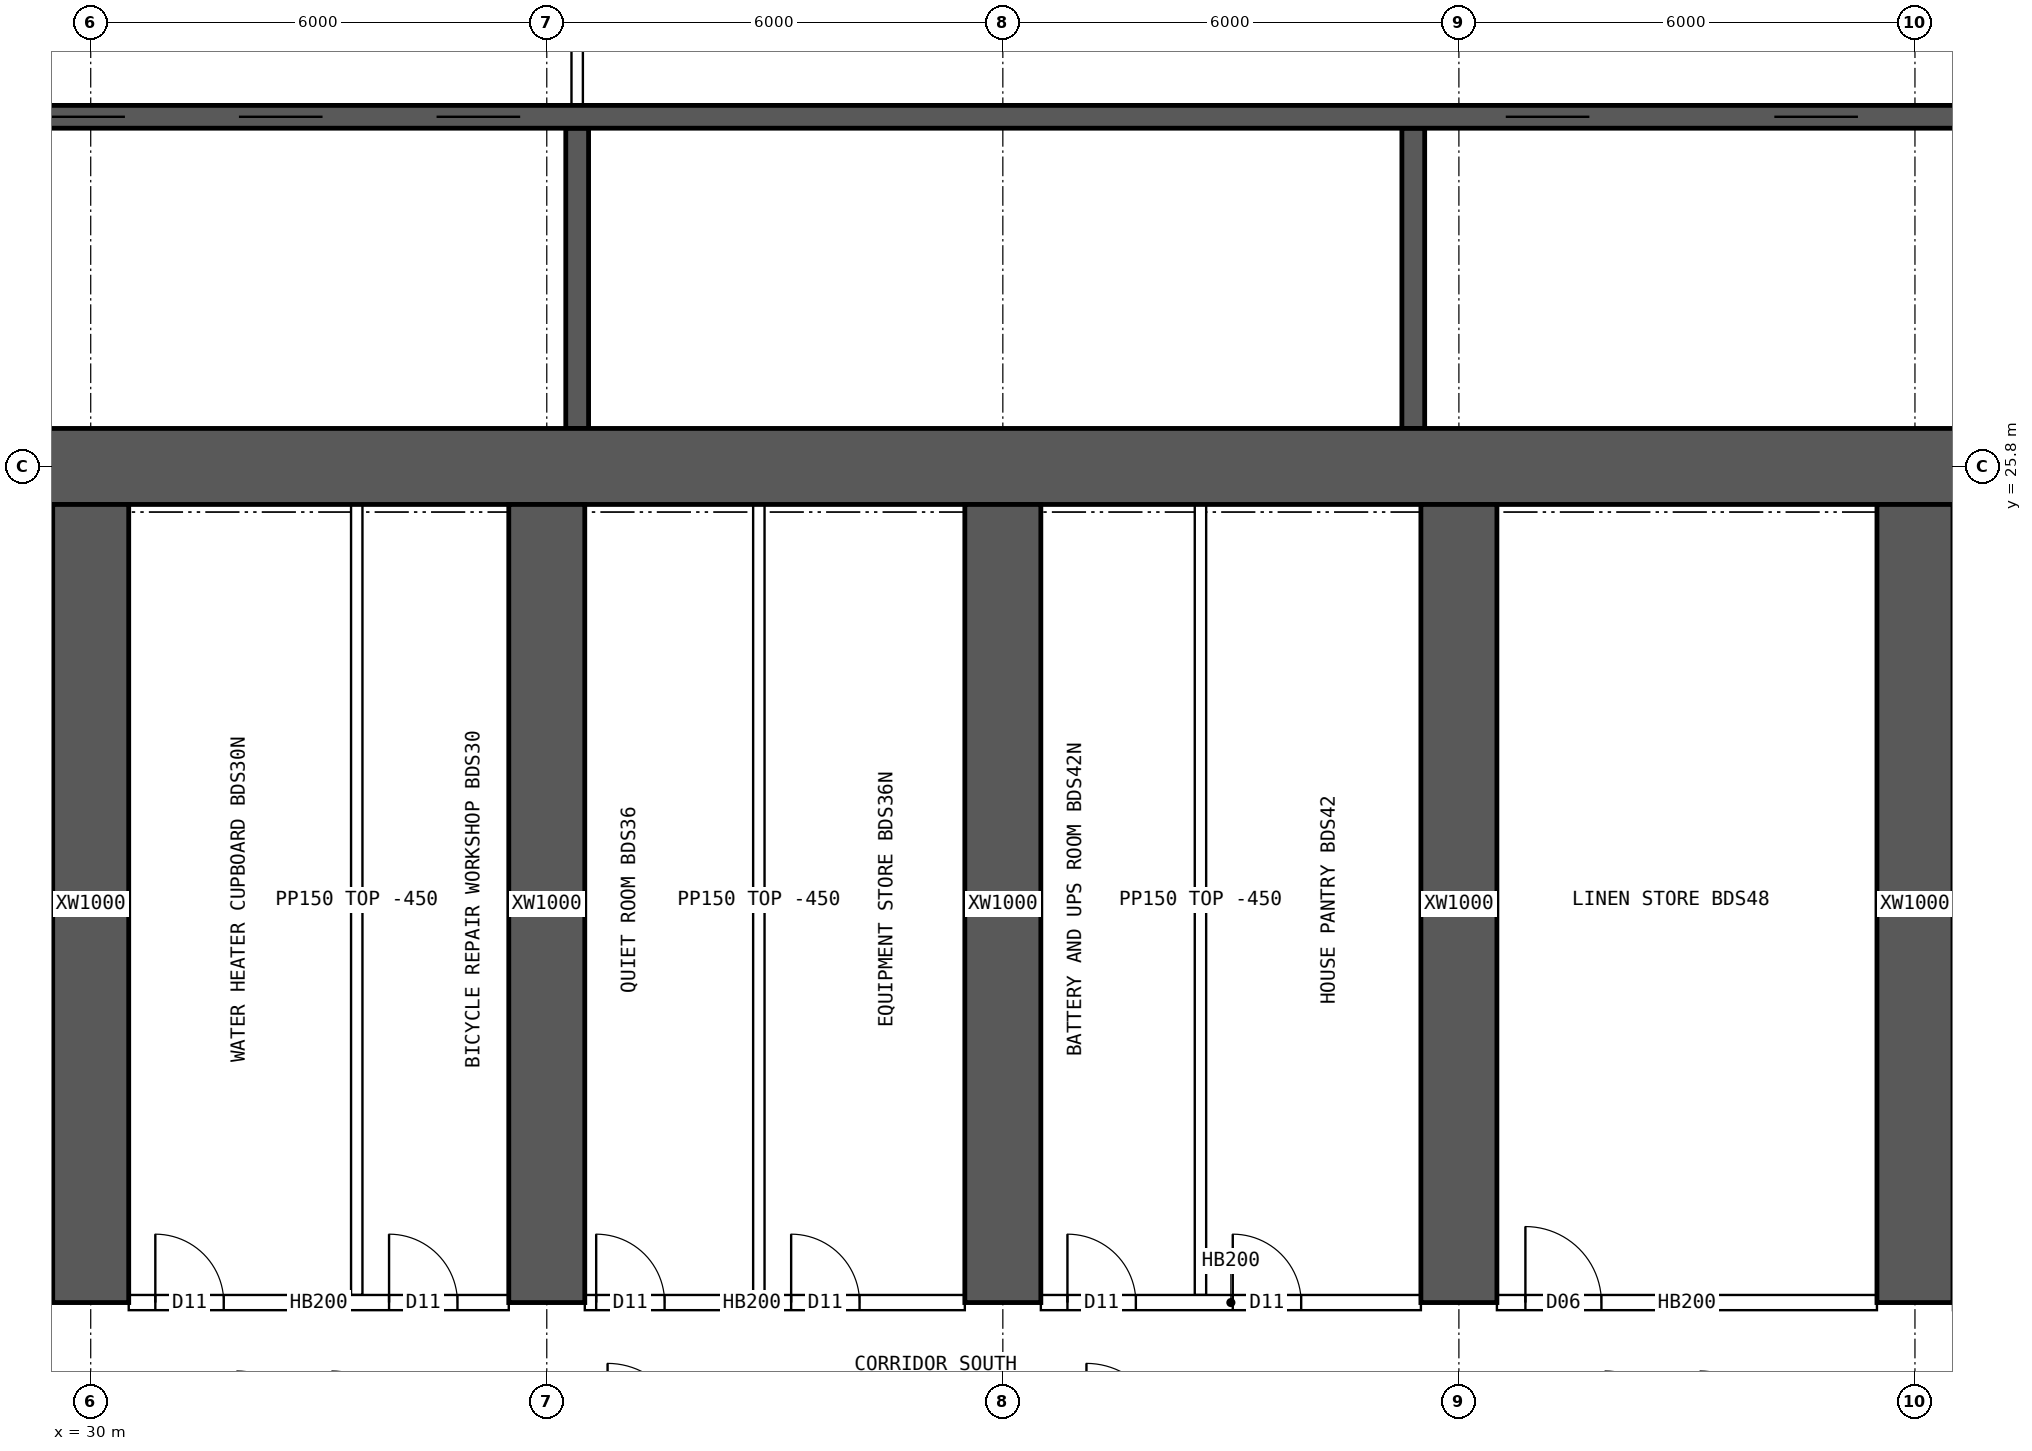
"""IFC4 building model, lengths in metres.
Left out: names, types, materials, properties, quantities, classifications, styles, units other than length and angle.
Written with IfcOpenShell. Run it as: python <this file> out.ifc"""

import sys

from ifc_helpers import new_model, si_unit, direction, frame, frame_2d, origin, place, context, subcontext, project, spatial, rectangle, extrude, element, fill, save


model = new_model("IFC4")
c1 = context("Model", 3, precision=1e-05, world=origin(), true_north=direction((0.0, 1.0)))
c2 = subcontext(c1, "Body", "Model", "MODEL_VIEW")
j1 = project(units=[si_unit("LENGTHUNIT", "METRE"), si_unit("PLANEANGLEUNIT", "RADIAN")], contexts=[c1])
p1 = place(None, origin())
s1 = spatial("IfcSite", under=j1, at=p1, CompositionType="ELEMENT")
p2 = place(p1, origin())
s2 = spatial("IfcBuilding", under=s1, at=p2, CompositionType="ELEMENT")
p3 = place(p2, frame((0.0, 0.0, 20.2)))
s3 = spatial("IfcBuildingStorey", under=s2, at=p3, CompositionType="ELEMENT", Elevation=20.2)
p4 = place(p3, frame((18.0, 25.8, 0.0), z_axis=(0.0, 0.0, 1.0), x_axis=(1.0, 0.0, 0.0)))
e1 = element("IfcWall", 1, at=p4, inside=s3, PredefinedType="SHEAR", context=c2, shape_type="SweptSolid", body=[
    extrude(rectangle(XDim=48.0, YDim=1.0, at=frame_2d((24.0, 0.0))), origin(), (0.0, 0.0, 1.0), 3.75),
])
p5 = place(p3, frame((18.5, 30.4, 0.0), z_axis=(0.0, 0.0, 1.0), x_axis=(1.0, 0.0, 0.0)))
e2 = element("IfcWall", 2, at=p5, inside=s3, PredefinedType="SHEAR", context=c2, shape_type="SweptSolid", body=[
    extrude(rectangle(XDim=47.0, YDim=0.3, at=frame_2d((23.5, 0.0))), origin(), (0.0, 0.0, 1.0), 3.75),
])
p6 = place(p5, frame((0.4, 0.0, 0.0)))
e3 = element("IfcOpeningElement", 3, at=p6, cuts=e2, PredefinedType="OPENING", context=c2, shape_type="SweptSolid", body=[
    extrude(rectangle(XDim=1.0, YDim=2.1, at=frame_2d((0.5, 1.05))), frame((0.0, 0.16, 0.0), z_axis=(0.0, -1.0, 0.0), x_axis=(1.0, 0.0, 0.0)), (0.0, 0.0, 1.0), 0.32),
])
p7 = place(p5, frame((45.6, 0.0, 0.0)))
e4 = element("IfcOpeningElement", 4, at=p7, cuts=e2, PredefinedType="OPENING", context=c2, shape_type="SweptSolid", body=[
    extrude(rectangle(XDim=1.0, YDim=2.1, at=frame_2d((0.5, 1.05))), frame((0.0, 0.16, 0.0), z_axis=(0.0, -1.0, 0.0), x_axis=(1.0, 0.0, 0.0)), (0.0, 0.0, 1.0), 0.32),
])
p8 = place(p5, frame((8.25, 0.0, 0.0)))
e5 = element("IfcOpeningElement", 5, at=p8, cuts=e2, PredefinedType="OPENING", context=c2, shape_type="SweptSolid", body=[
    extrude(rectangle(XDim=1.1, YDim=2.1, at=frame_2d((0.55, 1.05))), frame((0.0, 0.16, 0.0), z_axis=(0.0, -1.0, 0.0), x_axis=(1.0, 0.0, 0.0)), (0.0, 0.0, 1.0), 0.32),
])
p9 = place(p5, frame((10.85, 0.0, 0.0)))
e6 = element("IfcOpeningElement", 6, at=p9, cuts=e2, PredefinedType="OPENING", context=c2, shape_type="SweptSolid", body=[
    extrude(rectangle(XDim=1.1, YDim=2.1, at=frame_2d((0.55, 1.05))), frame((0.0, 0.16, 0.0), z_axis=(0.0, -1.0, 0.0), x_axis=(1.0, 0.0, 0.0)), (0.0, 0.0, 1.0), 0.32),
])
p10 = place(p5, frame((13.45, 0.0, 0.0)))
e7 = element("IfcOpeningElement", 7, at=p10, cuts=e2, PredefinedType="OPENING", context=c2, shape_type="SweptSolid", body=[
    extrude(rectangle(XDim=1.1, YDim=2.1, at=frame_2d((0.55, 1.05))), frame((0.0, 0.16, 0.0), z_axis=(0.0, -1.0, 0.0), x_axis=(1.0, 0.0, 0.0)), (0.0, 0.0, 1.0), 0.32),
])
p11 = place(p5, frame((16.05, 0.0, 0.0)))
e8 = element("IfcOpeningElement", 8, at=p11, cuts=e2, PredefinedType="OPENING", context=c2, shape_type="SweptSolid", body=[
    extrude(rectangle(XDim=1.1, YDim=2.1, at=frame_2d((0.55, 1.05))), frame((0.0, 0.16, 0.0), z_axis=(0.0, -1.0, 0.0), x_axis=(1.0, 0.0, 0.0)), (0.0, 0.0, 1.0), 0.32),
])
p12 = place(p5, frame((30.117, 0.0, 0.0)))
e9 = element("IfcOpeningElement", 9, at=p12, cuts=e2, PredefinedType="OPENING", context=c2, shape_type="SweptSolid", body=[
    extrude(rectangle(XDim=1.1, YDim=2.1, at=frame_2d((0.55, 1.05))), frame((0.0, 0.16, 0.0), z_axis=(0.0, -1.0, 0.0), x_axis=(1.0, 0.0, 0.0)), (0.0, 0.0, 1.0), 0.32),
])
p13 = place(p5, frame((33.65, 0.0, 0.0)))
e10 = element("IfcOpeningElement", 10, at=p13, cuts=e2, PredefinedType="OPENING", context=c2, shape_type="SweptSolid", body=[
    extrude(rectangle(XDim=1.1, YDim=2.1, at=frame_2d((0.55, 1.05))), frame((0.0, 0.16, 0.0), z_axis=(0.0, -1.0, 0.0), x_axis=(1.0, 0.0, 0.0)), (0.0, 0.0, 1.0), 0.32),
])
p14 = place(p5, frame((37.183, 0.0, 0.0)))
e11 = element("IfcOpeningElement", 11, at=p14, cuts=e2, PredefinedType="OPENING", context=c2, shape_type="SweptSolid", body=[
    extrude(rectangle(XDim=1.1, YDim=2.1, at=frame_2d((0.55, 1.05))), frame((0.0, 0.16, 0.0), z_axis=(0.0, -1.0, 0.0), x_axis=(1.0, 0.0, 0.0)), (0.0, 0.0, 1.0), 0.32),
])
for number, where, z_axis, x_axis in (
    (12, (36.4, 26.3, 0.0), (0.0, 0.0, 1.0), (0.0, 1.0, 0.0)),
    (13, (47.4, 26.3, 0.0), (0.0, 0.0, 1.0), (0.0, 1.0, 0.0)),
):
    element("IfcWall", number, at=place(p3, frame(where, z_axis=z_axis, x_axis=x_axis)), inside=s3, PredefinedType="SHEAR", context=c2, shape_type="SweptSolid", body=[
        extrude(rectangle(XDim=3.95, YDim=0.3, at=frame_2d((1.975, 0.0))), origin(), (0.0, 0.0, 1.0), 3.75),
    ])
for number, where, z_axis, x_axis in (
    (14, (30.0, 14.8, 0.0), (0.0, 0.0, 1.0), (0.0, 1.0, 0.0)),
    (15, (36.0, 14.8, 0.0), (0.0, 0.0, 1.0), (0.0, 1.0, 0.0)),
    (16, (42.0, 14.8, 0.0), (0.0, 0.0, 1.0), (0.0, 1.0, 0.0)),
    (17, (48.0, 14.8, 0.0), (0.0, 0.0, 1.0), (0.0, 1.0, 0.0)),
    (18, (54.0, 14.8, 0.0), (0.0, 0.0, 1.0), (0.0, 1.0, 0.0)),
):
    element("IfcWall", number, at=place(p3, frame(where, z_axis=z_axis, x_axis=x_axis)), inside=s3, PredefinedType="SHEAR", context=c2, shape_type="SweptSolid", body=[
        extrude(rectangle(XDim=10.5, YDim=1.0, at=frame_2d((5.25, 0.0))), origin(), (0.0, 0.0, 1.0), 3.75),
    ])
p15 = place(p3, frame((36.4, 30.55, 0.0), z_axis=(0.0, 0.0, 1.0), x_axis=(0.0, 1.0, 0.0)))
e19 = element("IfcWall", 19, at=p15, inside=s3, PredefinedType="SOLIDWALL", context=c2, shape_type="SweptSolid", body=[
    extrude(rectangle(XDim=3.9, YDim=0.15, at=frame_2d((1.95, 0.0))), origin(), (0.0, 0.0, 1.0), 3.3),
])
p16 = place(p15, frame((1.15, 0.0, 0.0)))
e20 = element("IfcOpeningElement", 20, at=p16, cuts=e19, PredefinedType="OPENING", context=c2, shape_type="SweptSolid", body=[
    extrude(rectangle(XDim=1.6, YDim=2.1, at=frame_2d((0.8, 1.05))), frame((0.0, 0.085, 0.0), z_axis=(0.0, -1.0, 0.0), x_axis=(1.0, 0.0, 0.0)), (0.0, 0.0, 1.0), 0.17),
])
p17 = place(p3, frame((30.5, 14.8, 0.0), z_axis=(0.0, 0.0, 1.0), x_axis=(1.0, 0.0, 0.0)))
e21 = element("IfcWall", 21, at=p17, inside=s3, PredefinedType="SOLIDWALL", context=c2, shape_type="SweptSolid", body=[
    extrude(rectangle(XDim=5.0, YDim=0.2, at=frame_2d((2.5, 0.0))), origin(), (0.0, 0.0, 1.0), 3.3),
])
p18 = place(p17, frame((0.35, 0.0, 0.0)))
e22 = element("IfcOpeningElement", 22, at=p18, cuts=e21, PredefinedType="OPENING", context=c2, shape_type="SweptSolid", body=[
    extrude(rectangle(XDim=0.9, YDim=2.1, at=frame_2d((0.45, 1.05))), frame((0.0, 0.11, 0.0), z_axis=(0.0, -1.0, 0.0), x_axis=(1.0, 0.0, 0.0)), (0.0, 0.0, 1.0), 0.22),
])
p19 = place(p17, frame((3.425, 0.0, 0.0)))
e23 = element("IfcOpeningElement", 23, at=p19, cuts=e21, PredefinedType="OPENING", context=c2, shape_type="SweptSolid", body=[
    extrude(rectangle(XDim=0.9, YDim=2.1, at=frame_2d((0.45, 1.05))), frame((0.0, 0.11, 0.0), z_axis=(0.0, -1.0, 0.0), x_axis=(1.0, 0.0, 0.0)), (0.0, 0.0, 1.0), 0.22),
])
p20 = place(p3, frame((36.5, 14.8, 0.0), z_axis=(0.0, 0.0, 1.0), x_axis=(1.0, 0.0, 0.0)))
e24 = element("IfcWall", 24, at=p20, inside=s3, PredefinedType="SOLIDWALL", context=c2, shape_type="SweptSolid", body=[
    extrude(rectangle(XDim=5.0, YDim=0.2, at=frame_2d((2.5, 0.0))), origin(), (0.0, 0.0, 1.0), 3.3),
])
p21 = place(p20, frame((0.15, 0.0, 0.0)))
e25 = element("IfcOpeningElement", 25, at=p21, cuts=e24, PredefinedType="OPENING", context=c2, shape_type="SweptSolid", body=[
    extrude(rectangle(XDim=0.9, YDim=2.1, at=frame_2d((0.45, 1.05))), frame((0.0, 0.11, 0.0), z_axis=(0.0, -1.0, 0.0), x_axis=(1.0, 0.0, 0.0)), (0.0, 0.0, 1.0), 0.22),
])
p22 = place(p20, frame((2.715, 0.0, 0.0)))
e26 = element("IfcOpeningElement", 26, at=p22, cuts=e24, PredefinedType="OPENING", context=c2, shape_type="SweptSolid", body=[
    extrude(rectangle(XDim=0.9, YDim=2.1, at=frame_2d((0.45, 1.05))), frame((0.0, 0.11, 0.0), z_axis=(0.0, -1.0, 0.0), x_axis=(1.0, 0.0, 0.0)), (0.0, 0.0, 1.0), 0.22),
])
p23 = place(p3, frame((42.5, 14.8, 0.0), z_axis=(0.0, 0.0, 1.0), x_axis=(1.0, 0.0, 0.0)))
e27 = element("IfcWall", 27, at=p23, inside=s3, PredefinedType="SOLIDWALL", context=c2, shape_type="SweptSolid", body=[
    extrude(rectangle(XDim=5.0, YDim=0.2, at=frame_2d((2.5, 0.0))), origin(), (0.0, 0.0, 1.0), 3.3),
])
p24 = place(p23, frame((0.35, 0.0, 0.0)))
e28 = element("IfcOpeningElement", 28, at=p24, cuts=e27, PredefinedType="OPENING", context=c2, shape_type="SweptSolid", body=[
    extrude(rectangle(XDim=0.9, YDim=2.1, at=frame_2d((0.45, 1.05))), frame((0.0, 0.11, 0.0), z_axis=(0.0, -1.0, 0.0), x_axis=(1.0, 0.0, 0.0)), (0.0, 0.0, 1.0), 0.22),
])
p25 = place(p23, frame((2.525, 0.0, 0.0)))
e29 = element("IfcOpeningElement", 29, at=p25, cuts=e27, PredefinedType="OPENING", context=c2, shape_type="SweptSolid", body=[
    extrude(rectangle(XDim=0.9, YDim=2.1, at=frame_2d((0.45, 1.05))), frame((0.0, 0.11, 0.0), z_axis=(0.0, -1.0, 0.0), x_axis=(1.0, 0.0, 0.0)), (0.0, 0.0, 1.0), 0.22),
])
p26 = place(p3, frame((48.5, 14.8, 0.0), z_axis=(0.0, 0.0, 1.0), x_axis=(1.0, 0.0, 0.0)))
e30 = element("IfcWall", 30, at=p26, inside=s3, PredefinedType="SOLIDWALL", context=c2, shape_type="SweptSolid", body=[
    extrude(rectangle(XDim=5.0, YDim=0.2, at=frame_2d((2.5, 0.0))), origin(), (0.0, 0.0, 1.0), 3.3),
])
p27 = place(p26, frame((0.375, 0.0, 0.0)))
e31 = element("IfcOpeningElement", 31, at=p27, cuts=e30, PredefinedType="OPENING", context=c2, shape_type="SweptSolid", body=[
    extrude(rectangle(XDim=1.0, YDim=2.1, at=frame_2d((0.5, 1.05))), frame((0.0, 0.11, 0.0), z_axis=(0.0, -1.0, 0.0), x_axis=(1.0, 0.0, 0.0)), (0.0, 0.0, 1.0), 0.22),
])
for number, where, z_axis, x_axis in (
    (32, (33.5, 14.9, 0.0), (0.0, 0.0, 1.0), (0.0, 1.0, 0.0)),
    (33, (38.79, 14.9, 0.0), (0.0, 0.0, 1.0), (0.0, 1.0, 0.0)),
    (34, (44.6, 14.9, 0.0), (0.0, 0.0, 1.0), (0.0, 1.0, 0.0)),
):
    element("IfcWall", number, at=place(p3, frame(where, z_axis=z_axis, x_axis=x_axis)), inside=s3, PredefinedType="PARTITIONING", context=c2, shape_type="SweptSolid", body=[
        extrude(rectangle(XDim=10.4, YDim=0.15, at=frame_2d((5.2, 0.0))), origin(), (0.0, 0.0, 1.0), 3.3),
    ])
p28 = place(p9, origin())
e35 = element("IfcDoor", 35, at=p28, inside=s3, OperationType="DOUBLE_DOOR_SLIDING", PredefinedType="DOOR", context=c2, shape_type="SweptSolid", body=[
    extrude(rectangle(XDim=1.1, YDim=2.1, at=frame_2d((0.55, 1.05))), frame((0.0, 0.025, 0.0), z_axis=(0.0, -1.0, 0.0), x_axis=(1.0, 0.0, 0.0)), (0.0, 0.0, 1.0), 0.05),
])
fill(e6, e35)
p29 = place(p10, origin())
e36 = element("IfcDoor", 36, at=p29, inside=s3, OperationType="DOUBLE_DOOR_SLIDING", PredefinedType="DOOR", context=c2, shape_type="SweptSolid", body=[
    extrude(rectangle(XDim=1.1, YDim=2.1, at=frame_2d((0.55, 1.05))), frame((0.0, 0.025, 0.0), z_axis=(0.0, -1.0, 0.0), x_axis=(1.0, 0.0, 0.0)), (0.0, 0.0, 1.0), 0.05),
])
fill(e7, e36)
p30 = place(p11, origin())
e37 = element("IfcDoor", 37, at=p30, inside=s3, OperationType="DOUBLE_DOOR_SLIDING", PredefinedType="DOOR", context=c2, shape_type="SweptSolid", body=[
    extrude(rectangle(XDim=1.1, YDim=2.1, at=frame_2d((0.55, 1.05))), frame((0.0, 0.025, 0.0), z_axis=(0.0, -1.0, 0.0), x_axis=(1.0, 0.0, 0.0)), (0.0, 0.0, 1.0), 0.05),
])
fill(e8, e37)
p31 = place(p12, origin())
e38 = element("IfcDoor", 38, at=p31, inside=s3, OperationType="DOUBLE_DOOR_SLIDING", PredefinedType="DOOR", context=c2, shape_type="SweptSolid", body=[
    extrude(rectangle(XDim=1.1, YDim=2.1, at=frame_2d((0.55, 1.05))), frame((0.0, 0.025, 0.0), z_axis=(0.0, -1.0, 0.0), x_axis=(1.0, 0.0, 0.0)), (0.0, 0.0, 1.0), 0.05),
])
fill(e9, e38)
p32 = place(p13, origin())
e39 = element("IfcDoor", 39, at=p32, inside=s3, OperationType="DOUBLE_DOOR_SLIDING", PredefinedType="DOOR", context=c2, shape_type="SweptSolid", body=[
    extrude(rectangle(XDim=1.1, YDim=2.1, at=frame_2d((0.55, 1.05))), frame((0.0, 0.025, 0.0), z_axis=(0.0, -1.0, 0.0), x_axis=(1.0, 0.0, 0.0)), (0.0, 0.0, 1.0), 0.05),
])
fill(e10, e39)
p33 = place(p18, origin())
e40 = element("IfcDoor", 40, at=p33, inside=s3, OperationType="SINGLE_SWING_LEFT", PredefinedType="DOOR", context=c2, shape_type="SweptSolid", body=[
    extrude(rectangle(XDim=0.9, YDim=2.1, at=frame_2d((0.45, 1.05))), frame((0.0, 0.025, 0.0), z_axis=(0.0, -1.0, 0.0), x_axis=(1.0, 0.0, 0.0)), (0.0, 0.0, 1.0), 0.05),
])
fill(e22, e40)
p34 = place(p19, origin())
e41 = element("IfcDoor", 41, at=p34, inside=s3, OperationType="SINGLE_SWING_LEFT", PredefinedType="DOOR", context=c2, shape_type="SweptSolid", body=[
    extrude(rectangle(XDim=0.9, YDim=2.1, at=frame_2d((0.45, 1.05))), frame((0.0, 0.025, 0.0), z_axis=(0.0, -1.0, 0.0), x_axis=(1.0, 0.0, 0.0)), (0.0, 0.0, 1.0), 0.05),
])
fill(e23, e41)
p35 = place(p21, origin())
e42 = element("IfcDoor", 42, at=p35, inside=s3, OperationType="SINGLE_SWING_LEFT", PredefinedType="DOOR", context=c2, shape_type="SweptSolid", body=[
    extrude(rectangle(XDim=0.9, YDim=2.1, at=frame_2d((0.45, 1.05))), frame((0.0, 0.025, 0.0), z_axis=(0.0, -1.0, 0.0), x_axis=(1.0, 0.0, 0.0)), (0.0, 0.0, 1.0), 0.05),
])
fill(e25, e42)
p36 = place(p22, origin())
e43 = element("IfcDoor", 43, at=p36, inside=s3, OperationType="SINGLE_SWING_LEFT", PredefinedType="DOOR", context=c2, shape_type="SweptSolid", body=[
    extrude(rectangle(XDim=0.9, YDim=2.1, at=frame_2d((0.45, 1.05))), frame((0.0, 0.025, 0.0), z_axis=(0.0, -1.0, 0.0), x_axis=(1.0, 0.0, 0.0)), (0.0, 0.0, 1.0), 0.05),
])
fill(e26, e43)
p37 = place(p24, origin())
e44 = element("IfcDoor", 44, at=p37, inside=s3, OperationType="SINGLE_SWING_LEFT", PredefinedType="DOOR", context=c2, shape_type="SweptSolid", body=[
    extrude(rectangle(XDim=0.9, YDim=2.1, at=frame_2d((0.45, 1.05))), frame((0.0, 0.025, 0.0), z_axis=(0.0, -1.0, 0.0), x_axis=(1.0, 0.0, 0.0)), (0.0, 0.0, 1.0), 0.05),
])
fill(e28, e44)
p38 = place(p25, origin())
e45 = element("IfcDoor", 45, at=p38, inside=s3, OperationType="SINGLE_SWING_LEFT", PredefinedType="DOOR", context=c2, shape_type="SweptSolid", body=[
    extrude(rectangle(XDim=0.9, YDim=2.1, at=frame_2d((0.45, 1.05))), frame((0.0, 0.025, 0.0), z_axis=(0.0, -1.0, 0.0), x_axis=(1.0, 0.0, 0.0)), (0.0, 0.0, 1.0), 0.05),
])
fill(e29, e45)
p39 = place(p27, origin())
e46 = element("IfcDoor", 46, at=p39, inside=s3, OperationType="SINGLE_SWING_LEFT", PredefinedType="DOOR", context=c2, shape_type="SweptSolid", body=[
    extrude(rectangle(XDim=1.0, YDim=2.1, at=frame_2d((0.5, 1.05))), frame((0.0, 0.025, 0.0), z_axis=(0.0, -1.0, 0.0), x_axis=(1.0, 0.0, 0.0)), (0.0, 0.0, 1.0), 0.05),
])
fill(e31, e46)
save(model, sys.argv[1])
